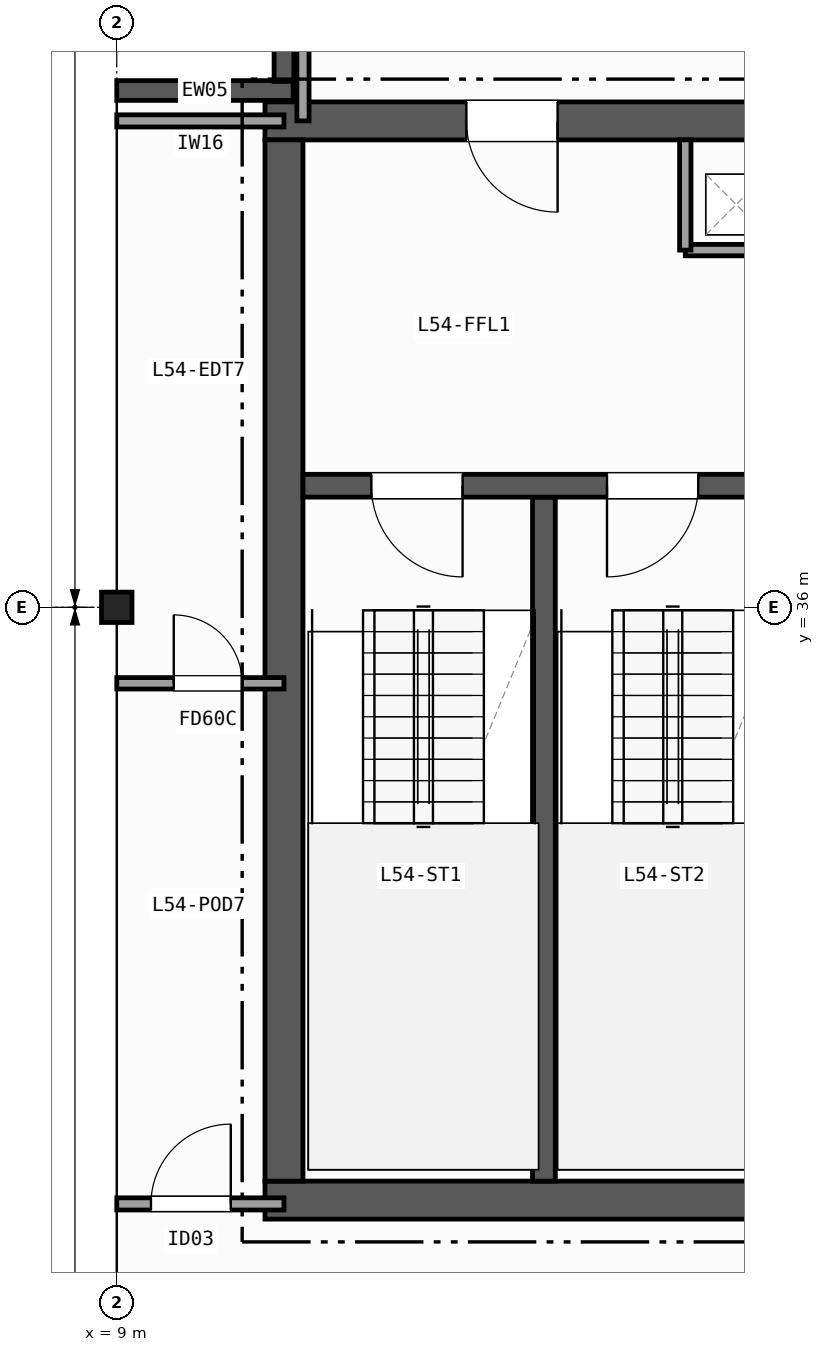
"""IFC4 building model, lengths in metres.
Left out: names, types, materials, properties, quantities, classifications, styles, units other than length and angle.
Written with IfcOpenShell. Run it as: python <this file> out.ifc"""

import sys

from ifc_helpers import new_model, si_unit, direction, frame, frame_2d, origin, origin_2d, place, context, subcontext, project, spatial, rectangle, i_section, extrude, element, fill, save


model = new_model("IFC4")
c1 = context("Model", 3, precision=1e-05, world=origin(), true_north=direction((0.0, 1.0)))
c2 = subcontext(c1, "Body", "Model", "MODEL_VIEW")
j1 = project(units=[si_unit("LENGTHUNIT", "METRE"), si_unit("PLANEANGLEUNIT", "RADIAN")], contexts=[c1])
p1 = place(None, origin())
s1 = spatial("IfcSite", under=j1, at=p1, CompositionType="ELEMENT")
p2 = place(p1, origin())
s2 = spatial("IfcBuilding", under=s1, at=p2, CompositionType="ELEMENT")
p3 = place(p2, frame((0.0, 0.0, 217.3)))
s3 = spatial("IfcBuildingStorey", under=s2, at=p3, CompositionType="ELEMENT", Elevation=217.3)
p4 = place(p3, frame((9.0, 36.0, 0.0), z_axis=(0.0, 0.0, 1.0), x_axis=(1.0, 0.0, 0.0)))
e1 = element("IfcColumn", 1, at=p4, inside=s3, PredefinedType="COLUMN", context=c2, shape_type="SweptSolid", body=[
    extrude(i_section(OverallWidth=0.401, OverallDepth=0.399, WebThickness=0.025, FlangeThickness=0.04, FilletRadius=0.015, at=origin_2d()), origin(), (0.0, 0.0, 1.0), 3.7),
])
p5 = place(p3, frame((9.0, 42.8, 0.0), z_axis=(0.0, 0.0, 1.0), x_axis=(1.0, 0.0, 0.0)))
e2 = element("IfcWall", 2, at=p5, inside=s3, PredefinedType="SOLIDWALL", context=c2, shape_type="SweptSolid", body=[
    extrude(rectangle(XDim=2.32, YDim=0.26, at=frame_2d((1.16, 0.0))), origin(), (0.0, 0.0, 1.0), 3.42),
])
p6 = place(p3, frame((11.2, 42.92, 0.0), z_axis=(0.0, 0.0, 1.0), x_axis=(0.0, 1.0, 0.0)))
e3 = element("IfcWall", 3, at=p6, inside=s3, PredefinedType="SOLIDWALL", context=c2, shape_type="SweptSolid", body=[
    extrude(rectangle(XDim=2.08, YDim=0.26, at=frame_2d((1.04, 0.0))), origin(), (0.0, 0.0, 1.0), 3.42),
])
p7 = place(p3, frame((10.95, 28.2, 0.0), z_axis=(0.0, 0.0, 1.0), x_axis=(1.0, 0.0, 0.0)))
e4 = element("IfcWall", 4, at=p7, inside=s3, PredefinedType="SHEAR", context=c2, shape_type="SweptSolid", body=[
    extrude(rectangle(XDim=13.9, YDim=0.5, at=frame_2d((6.95, 0.0))), origin(), (0.0, 0.0, 1.0), 3.42),
])
p8 = place(p3, frame((24.85, 42.4, 0.0), z_axis=(0.0, 0.0, 1.0), x_axis=(-1.0, 0.0, 0.0)))
e5 = element("IfcWall", 5, at=p8, inside=s3, PredefinedType="SHEAR", context=c2, shape_type="SweptSolid", body=[
    extrude(rectangle(XDim=13.9, YDim=0.5, at=frame_2d((6.95, 0.0))), origin(), (0.0, 0.0, 1.0), 3.42),
])
p9 = place(p8, frame((10.05, 0.0, 0.0)))
e6 = element("IfcOpeningElement", 6, at=p9, cuts=e5, PredefinedType="OPENING", context=c2, shape_type="SweptSolid", body=[
    extrude(rectangle(XDim=1.2, YDim=2.15, at=frame_2d((0.6, 1.075))), frame((0.0, 0.26, 0.0), z_axis=(0.0, -1.0, 0.0), x_axis=(1.0, 0.0, 0.0)), (0.0, 0.0, 1.0), 0.52),
])
p10 = place(p8, frame((3.0, 0.0, 0.0)))
e7 = element("IfcOpeningElement", 7, at=p10, cuts=e5, PredefinedType="OPENING", context=c2, shape_type="SweptSolid", body=[
    extrude(rectangle(XDim=0.9, YDim=2.1, at=frame_2d((0.45, 1.05))), frame((0.0, 0.26, 0.0), z_axis=(0.0, -1.0, 0.0), x_axis=(1.0, 0.0, 0.0)), (0.0, 0.0, 1.0), 0.52),
])
p11 = place(p3, frame((11.2, 42.15, 0.0), z_axis=(0.0, 0.0, 1.0), x_axis=(0.0, -1.0, 0.0)))
e8 = element("IfcWall", 8, at=p11, inside=s3, PredefinedType="SHEAR", context=c2, shape_type="SweptSolid", body=[
    extrude(rectangle(XDim=13.7, YDim=0.5, at=frame_2d((6.85, 0.0))), origin(), (0.0, 0.0, 1.0), 3.42),
])
p12 = place(p3, frame((14.62, 28.45, 0.0), z_axis=(0.0, 0.0, 1.0), x_axis=(0.0, 1.0, 0.0)))
e9 = element("IfcWall", 9, at=p12, inside=s3, PredefinedType="SHEAR", context=c2, shape_type="SweptSolid", body=[
    extrude(rectangle(XDim=9.0, YDim=0.3, at=frame_2d((4.5, 0.0))), origin(), (0.0, 0.0, 1.0), 3.42),
])
p13 = place(p3, frame((17.77, 37.6, 0.0), z_axis=(0.0, 0.0, 1.0), x_axis=(-1.0, 0.0, 0.0)))
e10 = element("IfcWall", 10, at=p13, inside=s3, PredefinedType="SHEAR", context=c2, shape_type="SweptSolid", body=[
    extrude(rectangle(XDim=6.32, YDim=0.3, at=frame_2d((3.16, 0.0))), origin(), (0.0, 0.0, 1.0), 3.42),
])
p14 = place(p13, frame((4.22, 0.0, 0.0)))
e11 = element("IfcOpeningElement", 11, at=p14, cuts=e10, PredefinedType="OPENING", context=c2, shape_type="SweptSolid", body=[
    extrude(rectangle(XDim=1.2, YDim=2.15, at=frame_2d((0.6, 1.075))), frame((0.0, 0.16, 0.0), z_axis=(0.0, -1.0, 0.0), x_axis=(1.0, 0.0, 0.0)), (0.0, 0.0, 1.0), 0.32),
])
p15 = place(p13, frame((1.12, 0.0, 0.0)))
e12 = element("IfcOpeningElement", 12, at=p15, cuts=e10, PredefinedType="OPENING", context=c2, shape_type="SweptSolid", body=[
    extrude(rectangle(XDim=1.2, YDim=2.15, at=frame_2d((0.6, 1.075))), frame((0.0, 0.16, 0.0), z_axis=(0.0, -1.0, 0.0), x_axis=(1.0, 0.0, 0.0)), (0.0, 0.0, 1.0), 0.32),
])
p16 = place(p3, frame((16.48, 40.7, 0.0), z_axis=(0.0, 0.0, 1.0), x_axis=(1.0, 0.0, 0.0)))
e13 = element("IfcWall", 13, at=p16, inside=s3, PredefinedType="PARTITIONING", context=c2, shape_type="SweptSolid", body=[
    extrude(rectangle(XDim=1.29, YDim=0.15, at=frame_2d((0.645, 0.0))), origin(), (0.0, 0.0, 1.0), 3.42),
])
p17 = place(p3, frame((16.48, 40.7, 0.0), z_axis=(0.0, 0.0, 1.0), x_axis=(0.0, 1.0, 0.0)))
e14 = element("IfcWall", 14, at=p17, inside=s3, PredefinedType="PARTITIONING", context=c2, shape_type="SweptSolid", body=[
    extrude(rectangle(XDim=1.45, YDim=0.15, at=frame_2d((0.725, 0.0))), origin(), (0.0, 0.0, 1.0), 3.42),
])
p18 = place(p3, frame((9.0, 28.15, 0.0), z_axis=(0.0, 0.0, 1.0), x_axis=(1.0, 0.0, 0.0)))
e15 = element("IfcWall", 15, at=p18, inside=s3, PredefinedType="PARTITIONING", context=c2, shape_type="SweptSolid", body=[
    extrude(rectangle(XDim=2.2, YDim=0.16, at=frame_2d((1.1, 0.0))), origin(), (0.0, 0.0, 1.0), 2.707),
])
p19 = place(p18, frame((0.45, 0.0, 0.0)))
e16 = element("IfcOpeningElement", 16, at=p19, cuts=e15, PredefinedType="OPENING", context=c2, shape_type="SweptSolid", body=[
    extrude(rectangle(XDim=1.05, YDim=2.15, at=frame_2d((0.525, 1.075))), frame((0.0, 0.09, 0.0), z_axis=(0.0, -1.0, 0.0), x_axis=(1.0, 0.0, 0.0)), (0.0, 0.0, 1.0), 0.18),
])
p20 = place(p3, frame((9.0, 42.4, 0.0), z_axis=(0.0, 0.0, 1.0), x_axis=(1.0, 0.0, 0.0)))
e17 = element("IfcWall", 17, at=p20, inside=s3, PredefinedType="PARTITIONING", context=c2, shape_type="SweptSolid", body=[
    extrude(rectangle(XDim=2.2, YDim=0.16, at=frame_2d((1.1, 0.0))), origin(), (0.0, 0.0, 1.0), 3.42),
])
p21 = place(p3, frame((11.45, 42.4, 0.0), z_axis=(0.0, 0.0, 1.0), x_axis=(0.0, 1.0, 0.0)))
e18 = element("IfcWall", 18, at=p21, inside=s3, PredefinedType="PARTITIONING", context=c2, shape_type="SweptSolid", body=[
    extrude(rectangle(XDim=2.666, YDim=0.16, at=frame_2d((1.333, 0.0))), origin(), (0.0, 0.0, 1.0), 3.42),
])
p22 = place(p3, frame((9.0, 35.0, 0.0), z_axis=(0.0, 0.0, 1.0), x_axis=(1.0, 0.0, 0.0)))
e19 = element("IfcWall", 19, at=p22, inside=s3, PredefinedType="PARTITIONING", context=c2, shape_type="SweptSolid", body=[
    extrude(rectangle(XDim=2.2, YDim=0.15, at=frame_2d((1.1, 0.0))), origin(), (0.0, 0.0, 1.0), 2.707),
])
p23 = place(p22, frame((0.75, 0.0, 0.0)))
e20 = element("IfcOpeningElement", 20, at=p23, cuts=e19, PredefinedType="OPENING", context=c2, shape_type="SweptSolid", body=[
    extrude(rectangle(XDim=0.9, YDim=2.1, at=frame_2d((0.45, 1.05))), frame((0.0, 0.085, 0.0), z_axis=(0.0, -1.0, 0.0), x_axis=(1.0, 0.0, 0.0)), (0.0, 0.0, 1.0), 0.17),
])
p24 = place(p14, origin())
e21 = element("IfcDoor", 21, at=p24, inside=s3, OperationType="SINGLE_SWING_LEFT", PredefinedType="DOOR", context=c2, shape_type="SweptSolid", body=[
    extrude(rectangle(XDim=1.2, YDim=2.15, at=frame_2d((0.6, 1.075))), frame((0.0, 0.025, 0.0), z_axis=(0.0, -1.0, 0.0), x_axis=(1.0, 0.0, 0.0)), (0.0, 0.0, 1.0), 0.05),
])
fill(e11, e21)
p25 = place(p15, origin())
e22 = element("IfcDoor", 22, at=p25, inside=s3, OperationType="SINGLE_SWING_RIGHT", PredefinedType="DOOR", context=c2, shape_type="SweptSolid", body=[
    extrude(rectangle(XDim=1.2, YDim=2.15, at=frame_2d((0.6, 1.075))), frame((0.0, 0.025, 0.0), z_axis=(0.0, -1.0, 0.0), x_axis=(1.0, 0.0, 0.0)), (0.0, 0.0, 1.0), 0.05),
])
fill(e12, e22)
p26 = place(p9, origin())
e23 = element("IfcDoor", 23, at=p26, inside=s3, OperationType="SINGLE_SWING_LEFT", PredefinedType="DOOR", context=c2, shape_type="SweptSolid", body=[
    extrude(rectangle(XDim=1.2, YDim=2.15, at=frame_2d((0.6, 1.075))), frame((0.0, 0.025, 0.0), z_axis=(0.0, -1.0, 0.0), x_axis=(1.0, 0.0, 0.0)), (0.0, 0.0, 1.0), 0.05),
])
fill(e6, e23)
p27 = place(p19, origin())
e24 = element("IfcDoor", 24, at=p27, inside=s3, OperationType="SINGLE_SWING_RIGHT", PredefinedType="DOOR", context=c2, shape_type="SweptSolid", body=[
    extrude(rectangle(XDim=1.05, YDim=2.15, at=frame_2d((0.525, 1.075))), frame((0.0, 0.025, 0.0), z_axis=(0.0, -1.0, 0.0), x_axis=(1.0, 0.0, 0.0)), (0.0, 0.0, 1.0), 0.05),
])
fill(e16, e24)
p28 = place(p23, origin())
e25 = element("IfcDoor", 25, at=p28, inside=s3, OperationType="SINGLE_SWING_LEFT", PredefinedType="DOOR", context=c2, shape_type="SweptSolid", body=[
    extrude(rectangle(XDim=0.9, YDim=2.1, at=frame_2d((0.45, 1.05))), frame((0.0, 0.025, 0.0), z_axis=(0.0, -1.0, 0.0), x_axis=(1.0, 0.0, 0.0)), (0.0, 0.0, 1.0), 0.05),
])
fill(e20, e25)
save(model, sys.argv[1])
